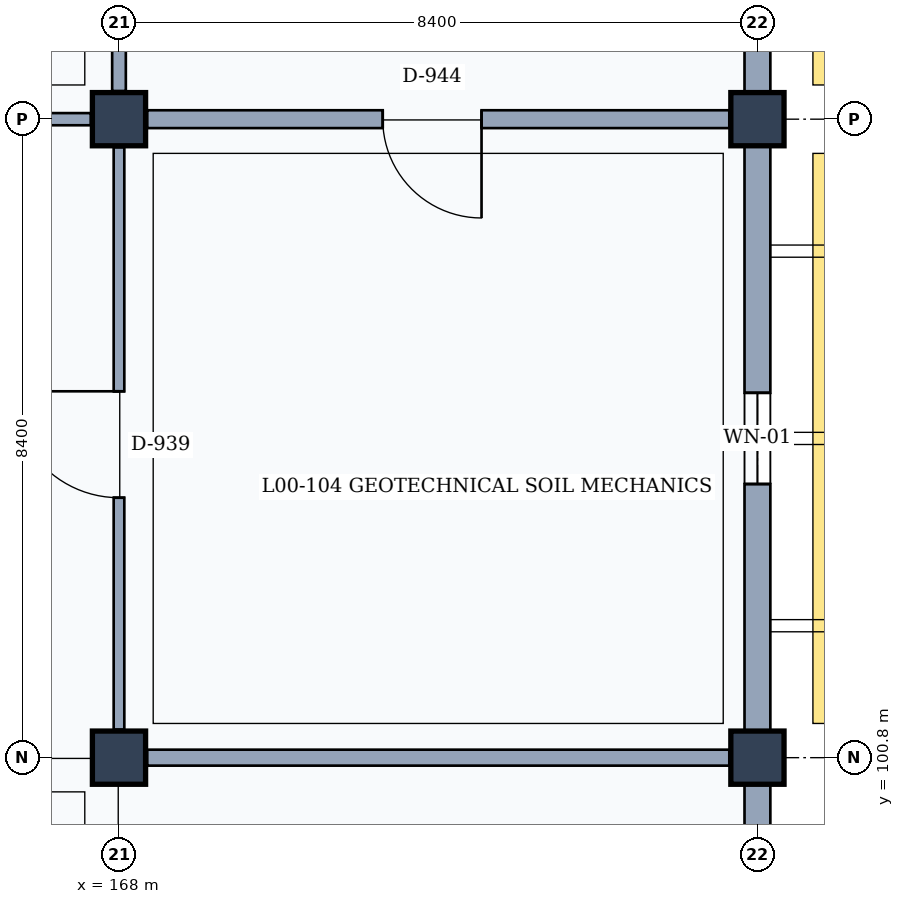
"""IFC4 building model, lengths in metres.
Left out: names, types, materials, properties, quantities, classifications, styles, units other than length and angle.
Written with IfcOpenShell. Run it as: python <this file> out.ifc"""

import sys

from ifc_helpers import new_model, si_unit, direction, frame, frame_2d, origin, origin_2d, place, context, subcontext, project, spatial, rectangle, extrude, element, fill, save


model = new_model("IFC4")
c1 = context("Model", 3, precision=1e-05, world=origin(), true_north=direction((0.0, 1.0)))
c2 = subcontext(c1, "Body", "Model", "MODEL_VIEW")
j1 = project(units=[si_unit("LENGTHUNIT", "METRE"), si_unit("PLANEANGLEUNIT", "RADIAN")], contexts=[c1])
p1 = place(None, origin())
s1 = spatial("IfcSite", under=j1, at=p1, CompositionType="ELEMENT")
p2 = place(p1, origin())
s2 = spatial("IfcBuilding", under=s1, at=p2, CompositionType="ELEMENT")
p3 = place(p2, origin())
s3 = spatial("IfcBuildingStorey", under=s2, at=p3, CompositionType="ELEMENT", Elevation=0.0)
for number, where, z_axis, x_axis in (
    (1, (168.0, 100.8, 0.0), (0.0, 0.0, 1.0), (1.0, 0.0, 0.0)),
    (2, (168.0, 109.2, 0.0), (0.0, 0.0, 1.0), (1.0, 0.0, 0.0)),
    (3, (176.4, 100.8, 0.0), (0.0, 0.0, 1.0), (1.0, 0.0, 0.0)),
    (4, (176.4, 109.2, 0.0), (0.0, 0.0, 1.0), (1.0, 0.0, 0.0)),
):
    element("IfcColumn", number, at=place(p3, frame(where, z_axis=z_axis, x_axis=x_axis)), inside=s3, PredefinedType="COLUMN", context=c2, shape_type="SweptSolid", body=[
        extrude(rectangle(XDim=0.7, YDim=0.7, at=origin_2d()), origin(), (0.0, 0.0, 1.0), 4.8),
    ])
p4 = place(p3, frame((176.4, 100.45, 0.0), z_axis=(0.0, 0.0, 1.0), x_axis=(0.0, -1.0, 0.0)))
e5 = element("IfcWall", 5, at=p4, inside=s3, PredefinedType="SOLIDWALL", context=c2, shape_type="SweptSolid", body=[
    extrude(rectangle(XDim=7.7, YDim=0.34, at=frame_2d((3.85, 0.0))), origin(), (0.0, 0.0, 1.0), 3.96),
])
p5 = place(p4, frame((2.95, 0.0, 0.0)))
e6 = element("IfcOpeningElement", 6, at=p5, cuts=e5, PredefinedType="OPENING", context=c2, shape_type="SweptSolid", body=[
    extrude(rectangle(XDim=1.8, YDim=2.2, at=frame_2d((0.9, 1.1))), frame((0.0, 0.18, 0.0), z_axis=(0.0, -1.0, 0.0), x_axis=(1.0, 0.0, 0.0)), (0.0, 0.0, 1.0), 0.36),
])
p6 = place(p3, frame((176.4, 108.85, 0.0), z_axis=(0.0, 0.0, 1.0), x_axis=(0.0, -1.0, 0.0)))
e7 = element("IfcWall", 7, at=p6, inside=s3, PredefinedType="SOLIDWALL", context=c2, shape_type="SweptSolid", body=[
    extrude(rectangle(XDim=7.7, YDim=0.34, at=frame_2d((3.85, 0.0))), origin(), (0.0, 0.0, 1.0), 3.96),
])
p7 = place(p6, frame((3.25, 0.0, 0.95)))
e8 = element("IfcOpeningElement", 8, at=p7, cuts=e7, PredefinedType="OPENING", context=c2, shape_type="SweptSolid", body=[
    extrude(rectangle(XDim=1.2, YDim=1.8, at=frame_2d((0.6, 0.9))), frame((0.0, 0.18, 0.0), z_axis=(0.0, -1.0, 0.0), x_axis=(1.0, 0.0, 0.0)), (0.0, 0.0, 1.0), 0.36),
])
p8 = place(p3, frame((176.4, 117.25, 0.0), z_axis=(0.0, 0.0, 1.0), x_axis=(0.0, -1.0, 0.0)))
e9 = element("IfcWall", 9, at=p8, inside=s3, PredefinedType="SOLIDWALL", context=c2, shape_type="SweptSolid", body=[
    extrude(rectangle(XDim=7.7, YDim=0.34, at=frame_2d((3.85, 0.0))), origin(), (0.0, 0.0, 1.0), 3.96),
])
p9 = place(p8, frame((2.65, 0.0, 0.95)))
e10 = element("IfcOpeningElement", 10, at=p9, cuts=e9, PredefinedType="OPENING", context=c2, shape_type="SweptSolid", body=[
    extrude(rectangle(XDim=2.4, YDim=1.8, at=frame_2d((1.2, 0.9))), frame((0.0, 0.18, 0.0), z_axis=(0.0, -1.0, 0.0), x_axis=(1.0, 0.0, 0.0)), (0.0, 0.0, 1.0), 0.36),
])
p10 = place(p3, frame((168.0, 101.17, 0.0), z_axis=(0.0, 0.0, 1.0), x_axis=(0.0, 1.0, 0.0)))
e11 = element("IfcWall", 11, at=p10, inside=s3, PredefinedType="PARTITIONING", context=c2, shape_type="SweptSolid", body=[
    extrude(rectangle(XDim=7.66, YDim=0.14, at=frame_2d((3.83, 0.0))), origin(), (0.0, 0.0, 1.0), 3.92),
])
p11 = place(p10, frame((3.05, 0.0, 0.0)))
e12 = element("IfcOpeningElement", 12, at=p11, cuts=e11, PredefinedType="OPENING", context=c2, shape_type="SweptSolid", body=[
    extrude(rectangle(XDim=1.4, YDim=2.25, at=frame_2d((0.7, 1.125))), frame((0.0, 0.08, 0.0), z_axis=(0.0, -1.0, 0.0), x_axis=(1.0, 0.0, 0.0)), (0.0, 0.0, 1.0), 0.16),
])
p12 = place(p3, frame((159.97, 109.2, 0.0), z_axis=(0.0, 0.0, 1.0), x_axis=(1.0, 0.0, 0.0)))
e13 = element("IfcWall", 13, at=p12, inside=s3, PredefinedType="PARTITIONING", context=c2, shape_type="SweptSolid", body=[
    extrude(rectangle(XDim=7.66, YDim=0.16, at=frame_2d((3.83, 0.0))), origin(), (0.0, 0.0, 1.0), 3.87),
])
p13 = place(p12, frame((3.0, 0.0, 0.0)))
e14 = element("IfcOpeningElement", 14, at=p13, cuts=e13, PredefinedType="OPENING", context=c2, shape_type="SweptSolid", body=[
    extrude(rectangle(XDim=1.5, YDim=2.3, at=frame_2d((0.75, 1.15))), frame((0.0, 0.09, 0.0), z_axis=(0.0, -1.0, 0.0), x_axis=(1.0, 0.0, 0.0)), (0.0, 0.0, 1.0), 0.18),
])
p14 = place(p3, frame((168.0, 109.57, 0.0), z_axis=(0.0, 0.0, 1.0), x_axis=(0.0, 1.0, 0.0)))
e15 = element("IfcWall", 15, at=p14, inside=s3, PredefinedType="PARTITIONING", context=c2, shape_type="SweptSolid", body=[
    extrude(rectangle(XDim=7.66, YDim=0.18, at=frame_2d((3.83, 0.0))), origin(), (0.0, 0.0, 1.0), 3.92),
])
p15 = place(p3, frame((168.37, 100.8, 0.0), z_axis=(0.0, 0.0, 1.0), x_axis=(1.0, 0.0, 0.0)))
e16 = element("IfcWall", 16, at=p15, inside=s3, PredefinedType="PARTITIONING", context=c2, shape_type="SweptSolid", body=[
    extrude(rectangle(XDim=7.66, YDim=0.21, at=frame_2d((3.83, 0.0))), origin(), (0.0, 0.0, 1.0), 3.87),
])
p16 = place(p3, frame((168.37, 109.2, 0.0), z_axis=(0.0, 0.0, 1.0), x_axis=(1.0, 0.0, 0.0)))
e17 = element("IfcWall", 17, at=p16, inside=s3, PredefinedType="PARTITIONING", context=c2, shape_type="SweptSolid", body=[
    extrude(rectangle(XDim=7.66, YDim=0.235, at=frame_2d((3.83, 0.0))), origin(), (0.0, 0.0, 1.0), 3.87),
])
p17 = place(p16, frame((3.1, 0.0, 0.0)))
e18 = element("IfcOpeningElement", 18, at=p17, cuts=e17, PredefinedType="OPENING", context=c2, shape_type="SweptSolid", body=[
    extrude(rectangle(XDim=1.3, YDim=2.2, at=frame_2d((0.65, 1.1))), frame((0.0, 0.127, 0.0), z_axis=(0.0, -1.0, 0.0), x_axis=(1.0, 0.0, 0.0)), (0.0, 0.0, 1.0), 0.255),
])
p18 = place(p7, origin())
e19 = element("IfcWindow", 19, at=p18, inside=s3, PartitioningType="SINGLE_PANEL", PredefinedType="WINDOW", context=c2, shape_type="SweptSolid", body=[
    extrude(rectangle(XDim=1.2, YDim=1.8, at=frame_2d((0.6, 0.9))), frame((0.0, 0.03, 0.0), z_axis=(0.0, -1.0, 0.0), x_axis=(1.0, 0.0, 0.0)), (0.0, 0.0, 1.0), 0.06),
])
fill(e8, e19)
p19 = place(p11, origin())
e20 = element("IfcDoor", 20, at=p19, inside=s3, OperationType="SINGLE_SWING_RIGHT", PredefinedType="DOOR", context=c2, shape_type="SweptSolid", body=[
    extrude(rectangle(XDim=1.4, YDim=2.25, at=frame_2d((0.7, 1.125))), frame((0.0, 0.025, 0.0), z_axis=(0.0, -1.0, 0.0), x_axis=(1.0, 0.0, 0.0)), (0.0, 0.0, 1.0), 0.05),
])
fill(e12, e20)
p20 = place(p17, frame((1.3, 0.0, 0.0), z_axis=(0.0, 0.0, 1.0), x_axis=(-1.0, 0.0, 0.0)))
e21 = element("IfcDoor", 21, at=p20, inside=s3, OperationType="SINGLE_SWING_LEFT", PredefinedType="DOOR", context=c2, shape_type="SweptSolid", body=[
    extrude(rectangle(XDim=1.3, YDim=2.2, at=frame_2d((0.65, 1.1))), frame((0.0, 0.025, 0.0), z_axis=(0.0, -1.0, 0.0), x_axis=(1.0, 0.0, 0.0)), (0.0, 0.0, 1.0), 0.05),
])
fill(e18, e21)
save(model, sys.argv[1])
